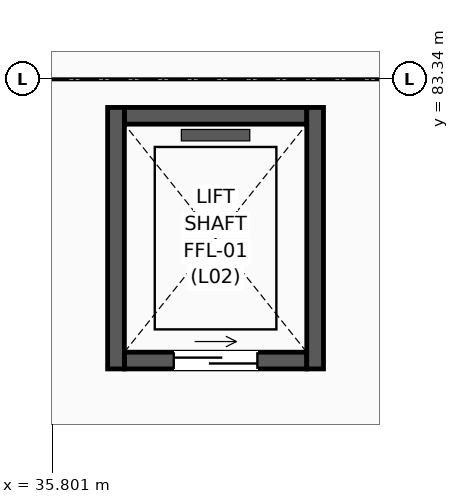
"""IFC4 building model, lengths in metres.
Left out: names, types, materials, properties, quantities, classifications, styles, units other than length and angle.
Written with IfcOpenShell. Run it as: python <this file> out.ifc"""

import sys

from ifc_helpers import new_model, si_unit, direction, frame, frame_2d, origin, place, context, subcontext, project, spatial, rectangle, extrude, element, fill, save


model = new_model("IFC4")
c1 = context("Model", 3, precision=1e-05, world=origin(), true_north=direction((0.0, 1.0)))
c2 = subcontext(c1, "Body", "Model", "MODEL_VIEW")
j1 = project(units=[si_unit("LENGTHUNIT", "METRE"), si_unit("PLANEANGLEUNIT", "RADIAN")], contexts=[c1])
p1 = place(None, origin())
s1 = spatial("IfcSite", under=j1, at=p1, CompositionType="ELEMENT")
p2 = place(p1, origin())
s2 = spatial("IfcBuilding", under=s1, at=p2, CompositionType="ELEMENT")
p3 = place(p2, frame((0.0, 0.0, 10.2)))
s3 = spatial("IfcBuildingStorey", under=s2, at=p3, CompositionType="ELEMENT", Elevation=10.2)
p4 = place(p3, frame((36.75, 79.64, 0.0), z_axis=(0.0, 0.0, 1.0), x_axis=(1.0, 0.0, 0.0)))
e1 = element("IfcWall", 1, at=p4, inside=s3, PredefinedType="SOLIDWALL", context=c2, shape_type="SweptSolid", body=[
    extrude(rectangle(XDim=2.4, YDim=0.22, at=frame_2d((1.2, 0.0))), origin(), (0.0, 0.0, 1.0), 4.225),
])
p5 = place(p4, frame((0.65, 0.0, 0.0)))
e2 = element("IfcOpeningElement", 2, at=p5, cuts=e1, PredefinedType="OPENING", context=c2, shape_type="SweptSolid", body=[
    extrude(rectangle(XDim=1.1, YDim=2.2, at=frame_2d((0.55, 1.1))), frame((0.0, 0.12, 0.0), z_axis=(0.0, -1.0, 0.0), x_axis=(1.0, 0.0, 0.0)), (0.0, 0.0, 1.0), 0.24),
])
p6 = place(p3, frame((36.75, 82.86, 0.0), z_axis=(0.0, 0.0, 1.0), x_axis=(1.0, 0.0, 0.0)))
e3 = element("IfcWall", 3, at=p6, inside=s3, PredefinedType="SOLIDWALL", context=c2, shape_type="SweptSolid", body=[
    extrude(rectangle(XDim=2.4, YDim=0.22, at=frame_2d((1.2, 0.0))), origin(), (0.0, 0.0, 1.0), 4.225),
])
for number, where, z_axis, x_axis in (
    (4, (36.64, 79.53, 0.0), (0.0, 0.0, 1.0), (0.0, 1.0, 0.0)),
    (5, (39.26, 79.53, 0.0), (0.0, 0.0, 1.0), (0.0, 1.0, 0.0)),
):
    element("IfcWall", number, at=place(p3, frame(where, z_axis=z_axis, x_axis=x_axis)), inside=s3, PredefinedType="SOLIDWALL", context=c2, shape_type="SweptSolid", body=[
        extrude(rectangle(XDim=3.44, YDim=0.22, at=frame_2d((1.72, 0.0))), origin(), (0.0, 0.0, 1.0), 4.225),
    ])
p7 = place(p5, origin())
e6 = element("IfcDoor", 6, at=p7, inside=s3, OperationType="SLIDING_TO_LEFT", PredefinedType="DOOR", context=c2, shape_type="SweptSolid", body=[
    extrude(rectangle(XDim=1.1, YDim=2.2, at=frame_2d((0.55, 1.1))), frame((0.0, 0.025, 0.0), z_axis=(0.0, -1.0, 0.0), x_axis=(1.0, 0.0, 0.0)), (0.0, 0.0, 1.0), 0.05),
])
fill(e2, e6)
save(model, sys.argv[1])
